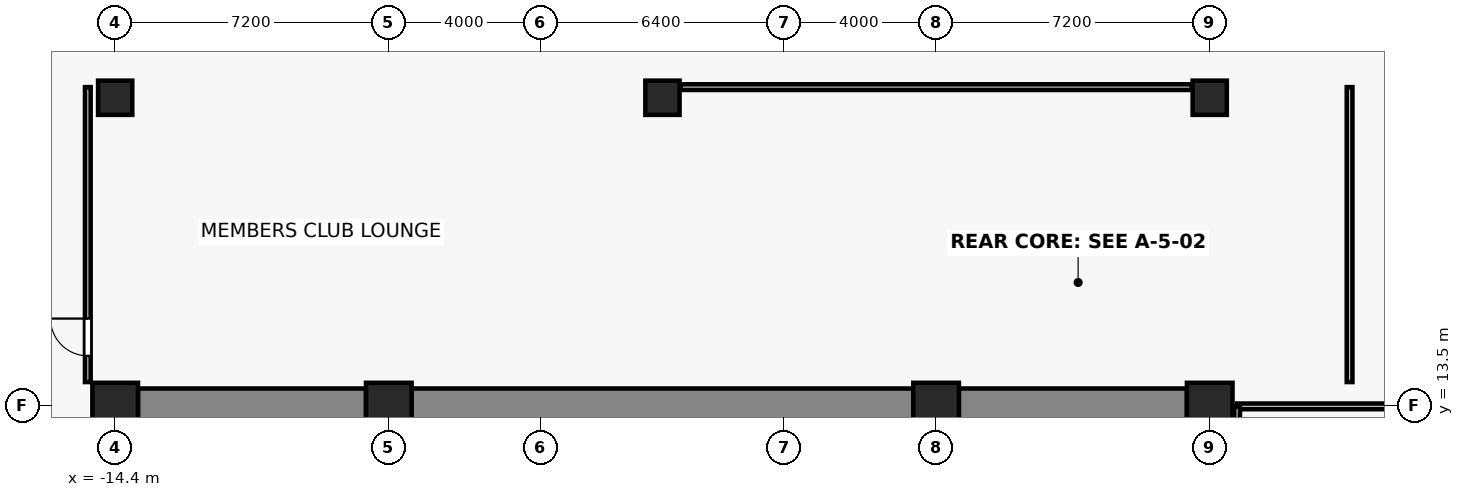
"""IFC4 building model, lengths in metres.
Left out: names, types, materials, properties, quantities, classifications, styles, units other than length and angle.
Written with IfcOpenShell. Run it as: python <this file> out.ifc"""

import sys

from ifc_helpers import new_model, si_unit, direction, frame, frame_2d, origin, origin_2d, place, context, subcontext, project, spatial, rectangle, extrude, source, transform, mapped, element, fill, save


model = new_model("IFC4")
c1 = context("Model", 3, precision=1e-05, world=origin(), true_north=direction((0.0, 1.0)))
c2 = subcontext(c1, "Body", "Model", "MODEL_VIEW")
j1 = project(units=[si_unit("LENGTHUNIT", "METRE"), si_unit("PLANEANGLEUNIT", "RADIAN")], contexts=[c1])
p1 = place(None, origin())
s1 = spatial("IfcSite", under=j1, at=p1, CompositionType="ELEMENT")
p2 = place(p1, origin())
s2 = spatial("IfcBuilding", under=s1, at=p2, CompositionType="ELEMENT")
p3 = place(p2, frame((0.0, 0.0, 9.4)))
s3 = spatial("IfcBuildingStorey", under=s2, at=p3, CompositionType="ELEMENT", Elevation=9.4)
for number, where, z_axis, x_axis in (
    (1, (-14.4, 13.5, 0.0), (0.0, 0.0, 1.0), (1.0, 0.0, 0.0)),
    (2, (-7.2, 13.5, 0.0), (0.0, 0.0, 1.0), (1.0, 0.0, 0.0)),
    (3, (7.2, 13.5, 0.0), (0.0, 0.0, 1.0), (1.0, 0.0, 0.0)),
    (4, (14.4, 13.5, 0.0), (0.0, 0.0, 1.0), (1.0, 0.0, 0.0)),
):
    element("IfcColumn", number, at=place(p3, frame(where, z_axis=z_axis, x_axis=x_axis)), inside=s3, PredefinedType="COLUMN", context=c2, shape_type="SweptSolid", body=[
        extrude(rectangle(XDim=1.2, YDim=1.2, at=origin_2d()), origin(), (0.0, 0.0, 1.0), 4.4),
    ])
for number, where, z_axis, x_axis in (
    (5, (-14.4, 21.6, 0.0), (0.0, 0.0, 1.0), (1.0, 0.0, 0.0)),
    (6, (0.0, 21.6, 0.0), (0.0, 0.0, 1.0), (1.0, 0.0, 0.0)),
    (7, (14.4, 21.6, 0.0), (0.0, 0.0, 1.0), (1.0, 0.0, 0.0)),
):
    element("IfcColumn", number, at=place(p3, frame(where, z_axis=z_axis, x_axis=x_axis)), inside=s3, PredefinedType="COLUMN", context=c2, shape_type="SweptSolid", body=[
        extrude(rectangle(XDim=0.9, YDim=0.9, at=origin_2d()), origin(), (0.0, 0.0, 1.0), 4.4),
    ])
p4 = place(p3, frame((-13.8, 13.5, 0.0), z_axis=(0.0, 0.0, 1.0), x_axis=(1.0, 0.0, 0.0)))
e8 = element("IfcWall", 8, at=p4, inside=s3, PredefinedType="SHEAR", context=c2, shape_type="SweptSolid", body=[
    extrude(rectangle(XDim=6.0, YDim=0.9, at=frame_2d((3.0, 0.0))), origin(), (0.0, 0.0, 1.0), 4.1),
])
p5 = place(p3, frame((-6.6, 13.5, 0.0), z_axis=(0.0, 0.0, 1.0), x_axis=(1.0, 0.0, 0.0)))
e9 = element("IfcWall", 9, at=p5, inside=s3, PredefinedType="SHEAR", context=c2, shape_type="SweptSolid", body=[
    extrude(rectangle(XDim=13.2, YDim=0.9, at=frame_2d((6.6, 0.0))), origin(), (0.0, 0.0, 1.0), 4.1),
])
p6 = place(p3, frame((7.8, 13.5, 0.0), z_axis=(0.0, 0.0, 1.0), x_axis=(1.0, 0.0, 0.0)))
e10 = element("IfcWall", 10, at=p6, inside=s3, PredefinedType="SHEAR", context=c2, shape_type="SweptSolid", body=[
    extrude(rectangle(XDim=6.0, YDim=0.9, at=frame_2d((3.0, 0.0))), origin(), (0.0, 0.0, 1.0), 4.1),
])
p7 = place(p3, frame((15.12, 13.48, 0.0), z_axis=(0.0, 0.0, 1.0), x_axis=(1.0, 0.0, 0.0)))
e11 = element("IfcWall", 11, at=p7, inside=s3, PredefinedType="PARTITIONING", context=c2, shape_type="SweptSolid", body=[
    extrude(rectangle(XDim=5.76, YDim=0.15, at=frame_2d((2.88, 0.0))), origin(), (0.0, 0.0, 1.0), 3.19),
])
p8 = place(p3, frame((15.12, -1.67, 0.0), z_axis=(0.0, 0.0, 1.0), x_axis=(0.0, 1.0, 0.0)))
e12 = element("IfcWall", 12, at=p8, inside=s3, PredefinedType="PARTITIONING", context=c2, shape_type="SweptSolid", body=[
    extrude(rectangle(XDim=15.15, YDim=0.15, at=frame_2d((7.575, 0.0))), origin(), (0.0, 0.0, 1.0), 3.19),
])
p9 = place(p3, frame((0.47, 21.88, 0.0), z_axis=(0.0, 0.0, 1.0), x_axis=(1.0, 0.0, 0.0)))
e13 = element("IfcWall", 13, at=p9, inside=s3, PredefinedType="PARTITIONING", context=c2, shape_type="SweptSolid", body=[
    extrude(rectangle(XDim=13.46, YDim=0.15, at=frame_2d((6.73, 0.0))), origin(), (0.0, 0.0, 1.0), 3.19),
])
p10 = place(p3, frame((-15.12, 14.12, 0.0), z_axis=(0.0, 0.0, 1.0), x_axis=(0.0, 1.0, 0.0)))
e14 = element("IfcWall", 14, at=p10, inside=s3, PredefinedType="PARTITIONING", context=c2, shape_type="SweptSolid", body=[
    extrude(rectangle(XDim=7.76, YDim=0.15, at=frame_2d((3.88, 0.0))), origin(), (0.0, 0.0, 1.0), 3.19),
])
p11 = place(p10, frame((0.69, 0.0, 0.0)))
e15 = element("IfcOpeningElement", 15, at=p11, cuts=e14, PredefinedType="OPENING", context=c2, shape_type="SweptSolid", body=[
    extrude(rectangle(XDim=0.98, YDim=2.15, at=frame_2d((0.49, 1.075))), frame((0.0, 0.085, 0.0), z_axis=(0.0, -1.0, 0.0), x_axis=(1.0, 0.0, 0.0)), (0.0, 0.0, 1.0), 0.17),
])
p12 = place(p3, frame((18.08, 21.88, 0.0), z_axis=(0.0, 0.0, 1.0), x_axis=(0.0, -1.0, 0.0)))
e16 = element("IfcWall", 16, at=p12, inside=s3, PredefinedType="PARTITIONING", context=c2, shape_type="SweptSolid", body=[
    extrude(rectangle(XDim=7.76, YDim=0.15, at=frame_2d((3.88, 0.0))), origin(), (0.0, 0.0, 1.0), 3.19),
])
m1 = source(origin(), c2, "Body", "SweptSolid", [
    extrude(rectangle(XDim=0.98, YDim=2.15, at=frame_2d((0.49, 1.075))), frame((0.0, 0.025, 0.0), z_axis=(0.0, -1.0, 0.0), x_axis=(1.0, 0.0, 0.0)), (0.0, 0.0, 1.0), 0.05),
])
p13 = place(p11, origin())
e17 = element("IfcDoor", 17, at=p13, inside=s3, OperationType="SINGLE_SWING_RIGHT", PredefinedType="DOOR", context=c2, shape_type="MappedRepresentation", body=[
    mapped(m1, transform((0.0, 0.0, 0.0), x_axis=(1.0, 0.0, 0.0), y_axis=(0.0, 1.0, 0.0), z_axis=(0.0, 0.0, 1.0), scale=1.0)),
])
fill(e15, e17)
save(model, sys.argv[1])
